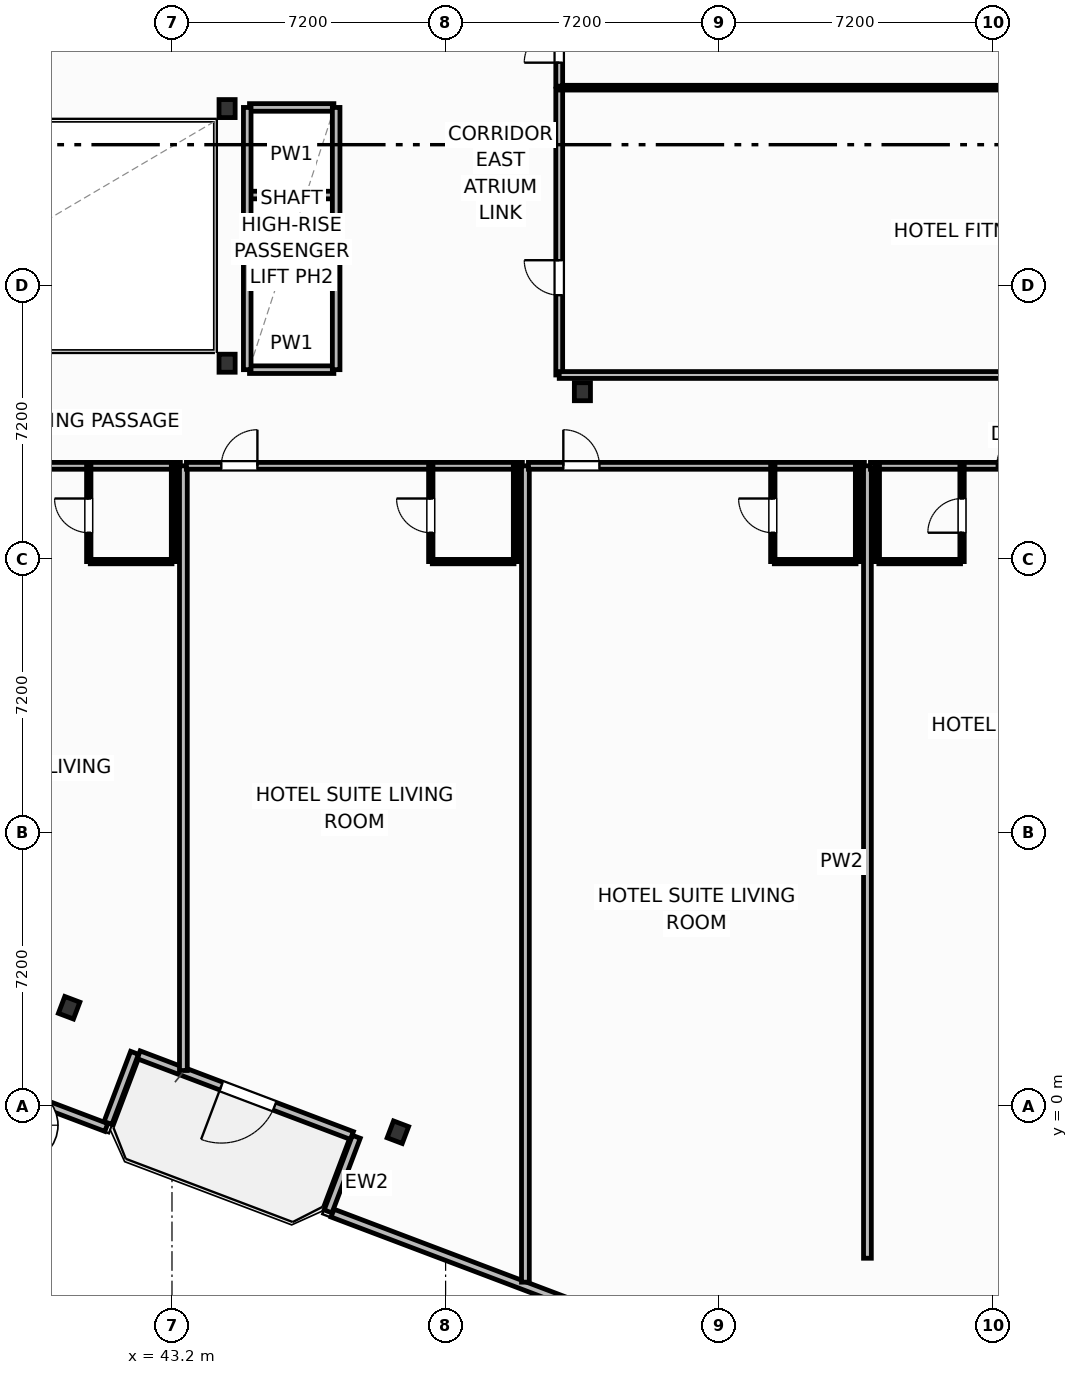
"""IFC4 building model, lengths in metres.
Left out: names, types, materials, properties, quantities, classifications, styles, units other than length and angle.
Written with IfcOpenShell. Run it as: python <this file> out.ifc"""

import sys

from ifc_helpers import new_model, si_unit, direction, frame, frame_2d, origin, origin_2d, place, context, subcontext, project, spatial, rectangle, i_section, extrude, element, fill, save


model = new_model("IFC4")
c1 = context("Model", 3, precision=1e-05, world=origin(), true_north=direction((0.0, 1.0)))
c2 = subcontext(c1, "Body", "Model", "MODEL_VIEW")
j1 = project(units=[si_unit("LENGTHUNIT", "METRE"), si_unit("PLANEANGLEUNIT", "RADIAN")], contexts=[c1])
p1 = place(None, origin())
s1 = spatial("IfcSite", under=j1, at=p1, CompositionType="ELEMENT")
p2 = place(p1, origin())
s2 = spatial("IfcBuilding", under=s1, at=p2, CompositionType="ELEMENT")
p3 = place(p2, frame((0.0, 0.0, 79.9)))
s3 = spatial("IfcBuildingStorey", under=s2, at=p3, CompositionType="ELEMENT", Elevation=79.9)
for number, where, z_axis, x_axis in (
    (1, (44.65, 19.55, 0.0), (0.0, 0.0, 1.0), (1.0, 0.0, 0.0)),
    (2, (44.65, 26.25, 0.0), (0.0, 0.0, 1.0), (1.0, 0.0, 0.0)),
    (3, (54.0, 18.8, 0.0), (0.0, 0.0, 1.0), (1.0, 0.0, 0.0)),
    (4, (40.493, 2.591, 0.0), (0.0, 0.0, 1.0), (0.935, -0.354, 0.0)),
    (5, (49.144, -0.684, 0.0), (0.0, 0.0, 1.0), (0.935, -0.354, 0.0)),
):
    element("IfcColumn", number, at=place(p3, frame(where, z_axis=z_axis, x_axis=x_axis)), inside=s3, PredefinedType="COLUMN", context=c2, shape_type="SweptSolid", body=[
        extrude(i_section(OverallWidth=0.424, OverallDepth=0.474, WebThickness=0.048, FlangeThickness=0.077, FilletRadius=0.025, at=origin_2d()), origin(), (0.0, 0.0, 1.0), 3.7),
    ])
p4 = place(p3, frame((47.935, -0.771, 0.0), z_axis=(0.0, 0.0, 1.0), x_axis=(-0.935227640088, 0.354046976001, 0.0)))
e6 = element("IfcWall", 6, at=p4, inside=s3, PredefinedType="SOLIDWALL", context=c2, shape_type="SweptSolid", body=[
    extrude(rectangle(XDim=6.0, YDim=0.22, at=frame_2d((3.0, 0.0))), origin(), (0.0, 0.0, 1.0), 2.73),
])
p5 = place(p4, frame((2.176, 0.0, 0.0)))
e7 = element("IfcOpeningElement", 7, at=p5, cuts=e6, PredefinedType="OPENING", context=c2, shape_type="SweptSolid", body=[
    extrude(rectangle(XDim=1.5, YDim=2.25, at=frame_2d((0.75, 1.125))), frame((0.0, 0.12, 0.0), z_axis=(0.0, -1.0, 0.0), x_axis=(1.0, 0.0, 0.0)), (0.0, 0.0, 1.0), 0.24),
])
p6 = place(p3, frame((33.957, 2.286, 0.0), z_axis=(0.0, 0.0, 1.0), x_axis=(0.935220736163, -0.354065212427, 0.0)))
e8 = element("IfcWall", 8, at=p6, inside=s3, PredefinedType="SOLIDWALL", context=c2, shape_type="SweptSolid", body=[
    extrude(rectangle(XDim=8.035, YDim=0.22, at=frame_2d((4.018, 0.0))), origin(), (0.0, 0.0, 1.0), 2.73),
])
p7 = place(p6, frame((3.192, 0.0, 0.8)))
e9 = element("IfcOpeningElement", 9, at=p7, cuts=e8, PredefinedType="OPENING", context=c2, shape_type="SweptSolid", body=[
    extrude(rectangle(XDim=1.65, YDim=1.65, at=frame_2d((0.825, 0.825))), frame((0.0, 0.12, 0.0), z_axis=(0.0, -1.0, 0.0), x_axis=(1.0, 0.0, 0.0)), (0.0, 0.0, 1.0), 0.24),
])
p8 = place(p3, frame((41.516, -0.442, 0.0), z_axis=(0.0, 0.0, 1.0), x_axis=(0.354061611705, 0.935222099352, 0.0)))
e10 = element("IfcWall", 10, at=p8, inside=s3, PredefinedType="SOLIDWALL", context=c2, shape_type="SweptSolid", body=[
    extrude(rectangle(XDim=1.975, YDim=0.22, at=frame_2d((0.987, 0.0))), origin(), (0.0, 0.0, 1.0), 2.73),
])
p9 = place(p3, frame((48.051, -0.805, 0.0), z_axis=(0.0, 0.0, 1.0), x_axis=(-0.353988291547, -0.935249854022, 0.0)))
e11 = element("IfcWall", 11, at=p9, inside=s3, PredefinedType="SOLIDWALL", context=c2, shape_type="SweptSolid", body=[
    extrude(rectangle(XDim=2.1, YDim=0.22, at=frame_2d((1.05, 0.0))), origin(), (0.0, 0.0, 1.0), 2.73),
])
p10 = place(p3, frame((47.424, -2.813, 0.0), z_axis=(0.0, 0.0, 1.0), x_axis=(0.935225962032, -0.354051408614, 0.0)))
e12 = element("IfcWall", 12, at=p10, inside=s3, PredefinedType="SOLIDWALL", context=c2, shape_type="SweptSolid", body=[
    extrude(rectangle(XDim=14.347, YDim=0.22, at=frame_2d((7.173, 0.0))), origin(), (0.0, 0.0, 1.0), 2.73),
])
p11 = place(p10, frame((6.348, 0.0, 0.8)))
e13 = element("IfcOpeningElement", 13, at=p11, cuts=e12, PredefinedType="OPENING", context=c2, shape_type="SweptSolid", body=[
    extrude(rectangle(XDim=1.65, YDim=1.65, at=frame_2d((0.825, 0.825))), frame((0.0, 0.12, 0.0), z_axis=(0.0, -1.0, 0.0), x_axis=(1.0, 0.0, 0.0)), (0.0, 0.0, 1.0), 0.24),
])
p12 = place(p3, frame((34.58, 16.85, 0.0), z_axis=(0.0, 0.0, 1.0), x_axis=(1.0, 0.0, 0.0)))
e14 = element("IfcWall", 14, at=p12, inside=s3, PredefinedType="PARTITIONING", context=c2, shape_type="SweptSolid", body=[
    extrude(rectangle(XDim=8.84, YDim=0.18, at=frame_2d((4.42, 0.0))), origin(), (0.0, 0.0, 1.0), 3.45),
])
p13 = place(p12, frame((0.918, 0.0, 0.0)))
e15 = element("IfcOpeningElement", 15, at=p13, cuts=e14, PredefinedType="OPENING", context=c2, shape_type="SweptSolid", body=[
    extrude(rectangle(XDim=0.95, YDim=2.15, at=frame_2d((0.475, 1.075))), frame((0.0, 0.1, 0.0), z_axis=(0.0, -1.0, 0.0), x_axis=(1.0, 0.0, 0.0)), (0.0, 0.0, 1.0), 0.2),
])
p14 = place(p3, frame((41.05, 14.33, 0.0), z_axis=(0.0, 0.0, 1.0), x_axis=(1.0, 0.0, 0.0)))
e16 = element("IfcWall", 16, at=p14, inside=s3, PredefinedType="PARTITIONING", context=c2, shape_type="SweptSolid", body=[
    extrude(rectangle(XDim=2.15, YDim=0.115, at=frame_2d((1.075, 0.0))), origin(), (0.0, 0.0, 1.0), 3.45),
])
p15 = place(p3, frame((41.01, 14.33, 0.0), z_axis=(0.0, 0.0, 1.0), x_axis=(0.0, 1.0, 0.0)))
e17 = element("IfcWall", 17, at=p15, inside=s3, PredefinedType="PARTITIONING", context=c2, shape_type="SweptSolid", body=[
    extrude(rectangle(XDim=2.52, YDim=0.115, at=frame_2d((1.26, 0.0))), origin(), (0.0, 0.0, 1.0), 3.45),
])
p16 = place(p15, frame((0.76, 0.0, 0.0)))
e18 = element("IfcOpeningElement", 18, at=p16, cuts=e17, PredefinedType="OPENING", context=c2, shape_type="SweptSolid", body=[
    extrude(rectangle(XDim=0.9, YDim=2.05, at=frame_2d((0.45, 1.025))), frame((0.0, 0.067, 0.0), z_axis=(0.0, -1.0, 0.0), x_axis=(1.0, 0.0, 0.0)), (0.0, 0.0, 1.0), 0.135),
])
p17 = place(p3, frame((43.24, 14.33, 0.0), z_axis=(0.0, 0.0, 1.0), x_axis=(0.0, 1.0, 0.0)))
e19 = element("IfcWall", 19, at=p17, inside=s3, PredefinedType="PARTITIONING", context=c2, shape_type="SweptSolid", body=[
    extrude(rectangle(XDim=2.52, YDim=0.115, at=frame_2d((1.26, 0.0))), origin(), (0.0, 0.0, 1.0), 2.58),
])
p18 = place(p3, frame((43.5, 0.939, 0.0), z_axis=(0.0, 0.0, 1.0), x_axis=(0.0, 1.0, 0.0)))
e20 = element("IfcWall", 20, at=p18, inside=s3, PredefinedType="PARTITIONING", context=c2, shape_type="SweptSolid", body=[
    extrude(rectangle(XDim=15.911, YDim=0.205, at=frame_2d((7.955, 0.0))), origin(), (0.0, 0.0, 1.0), 2.58),
])
p19 = place(p3, frame((43.58, 16.85, 0.0), z_axis=(0.0, 0.0, 1.0), x_axis=(1.0, 0.0, 0.0)))
e21 = element("IfcWall", 21, at=p19, inside=s3, PredefinedType="PARTITIONING", context=c2, shape_type="SweptSolid", body=[
    extrude(rectangle(XDim=8.84, YDim=0.18, at=frame_2d((4.42, 0.0))), origin(), (0.0, 0.0, 1.0), 3.45),
])
p20 = place(p19, frame((0.918, 0.0, 0.0)))
e22 = element("IfcOpeningElement", 22, at=p20, cuts=e21, PredefinedType="OPENING", context=c2, shape_type="SweptSolid", body=[
    extrude(rectangle(XDim=0.95, YDim=2.15, at=frame_2d((0.475, 1.075))), frame((0.0, 0.1, 0.0), z_axis=(0.0, -1.0, 0.0), x_axis=(1.0, 0.0, 0.0)), (0.0, 0.0, 1.0), 0.2),
])
p21 = place(p3, frame((50.05, 14.33, 0.0), z_axis=(0.0, 0.0, 1.0), x_axis=(1.0, 0.0, 0.0)))
e23 = element("IfcWall", 23, at=p21, inside=s3, PredefinedType="PARTITIONING", context=c2, shape_type="SweptSolid", body=[
    extrude(rectangle(XDim=2.15, YDim=0.115, at=frame_2d((1.075, 0.0))), origin(), (0.0, 0.0, 1.0), 3.45),
])
p22 = place(p3, frame((50.01, 14.33, 0.0), z_axis=(0.0, 0.0, 1.0), x_axis=(0.0, 1.0, 0.0)))
e24 = element("IfcWall", 24, at=p22, inside=s3, PredefinedType="PARTITIONING", context=c2, shape_type="SweptSolid", body=[
    extrude(rectangle(XDim=2.52, YDim=0.115, at=frame_2d((1.26, 0.0))), origin(), (0.0, 0.0, 1.0), 3.45),
])
p23 = place(p22, frame((0.76, 0.0, 0.0)))
e25 = element("IfcOpeningElement", 25, at=p23, cuts=e24, PredefinedType="OPENING", context=c2, shape_type="SweptSolid", body=[
    extrude(rectangle(XDim=0.9, YDim=2.05, at=frame_2d((0.45, 1.025))), frame((0.0, 0.067, 0.0), z_axis=(0.0, -1.0, 0.0), x_axis=(1.0, 0.0, 0.0)), (0.0, 0.0, 1.0), 0.135),
])
p24 = place(p3, frame((52.24, 14.33, 0.0), z_axis=(0.0, 0.0, 1.0), x_axis=(0.0, 1.0, 0.0)))
e26 = element("IfcWall", 26, at=p24, inside=s3, PredefinedType="PARTITIONING", context=c2, shape_type="SweptSolid", body=[
    extrude(rectangle(XDim=2.52, YDim=0.115, at=frame_2d((1.26, 0.0))), origin(), (0.0, 0.0, 1.0), 3.45),
])
p25 = place(p3, frame((52.5, -4.63, 0.0), z_axis=(0.0, 0.0, 1.0), x_axis=(0.0, 1.0, 0.0)))
e27 = element("IfcWall", 27, at=p25, inside=s3, PredefinedType="PARTITIONING", context=c2, shape_type="SweptSolid", body=[
    extrude(rectangle(XDim=21.48, YDim=0.205, at=frame_2d((10.74, 0.0))), origin(), (0.0, 0.0, 1.0), 2.58),
])
p26 = place(p3, frame((52.58, 16.85, 0.0), z_axis=(0.0, 0.0, 1.0), x_axis=(1.0, 0.0, 0.0)))
e28 = element("IfcWall", 28, at=p26, inside=s3, PredefinedType="PARTITIONING", context=c2, shape_type="SweptSolid", body=[
    extrude(rectangle(XDim=8.84, YDim=0.18, at=frame_2d((4.42, 0.0))), origin(), (0.0, 0.0, 1.0), 2.58),
])
p27 = place(p26, frame((0.918, 0.0, 0.0)))
e29 = element("IfcOpeningElement", 29, at=p27, cuts=e28, PredefinedType="OPENING", context=c2, shape_type="SweptSolid", body=[
    extrude(rectangle(XDim=0.95, YDim=2.15, at=frame_2d((0.475, 1.075))), frame((0.0, 0.1, 0.0), z_axis=(0.0, -1.0, 0.0), x_axis=(1.0, 0.0, 0.0)), (0.0, 0.0, 1.0), 0.2),
])
p28 = place(p3, frame((59.05, 14.33, 0.0), z_axis=(0.0, 0.0, 1.0), x_axis=(1.0, 0.0, 0.0)))
e30 = element("IfcWall", 30, at=p28, inside=s3, PredefinedType="PARTITIONING", context=c2, shape_type="SweptSolid", body=[
    extrude(rectangle(XDim=2.15, YDim=0.115, at=frame_2d((1.075, 0.0))), origin(), (0.0, 0.0, 1.0), 3.45),
])
p29 = place(p3, frame((59.01, 14.33, 0.0), z_axis=(0.0, 0.0, 1.0), x_axis=(0.0, 1.0, 0.0)))
e31 = element("IfcWall", 31, at=p29, inside=s3, PredefinedType="PARTITIONING", context=c2, shape_type="SweptSolid", body=[
    extrude(rectangle(XDim=2.52, YDim=0.115, at=frame_2d((1.26, 0.0))), origin(), (0.0, 0.0, 1.0), 3.45),
])
p30 = place(p29, frame((0.76, 0.0, 0.0)))
e32 = element("IfcOpeningElement", 32, at=p30, cuts=e31, PredefinedType="OPENING", context=c2, shape_type="SweptSolid", body=[
    extrude(rectangle(XDim=0.9, YDim=2.05, at=frame_2d((0.45, 1.025))), frame((0.0, 0.067, 0.0), z_axis=(0.0, -1.0, 0.0), x_axis=(1.0, 0.0, 0.0)), (0.0, 0.0, 1.0), 0.135),
])
p31 = place(p3, frame((61.24, 14.33, 0.0), z_axis=(0.0, 0.0, 1.0), x_axis=(0.0, 1.0, 0.0)))
e33 = element("IfcWall", 33, at=p31, inside=s3, PredefinedType="PARTITIONING", context=c2, shape_type="SweptSolid", body=[
    extrude(rectangle(XDim=2.52, YDim=0.115, at=frame_2d((1.26, 0.0))), origin(), (0.0, 0.0, 1.0), 3.45),
])
p32 = place(p3, frame((61.5, -4.0, 0.0), z_axis=(0.0, 0.0, 1.0), x_axis=(0.0, 1.0, 0.0)))
e34 = element("IfcWall", 34, at=p32, inside=s3, PredefinedType="PARTITIONING", context=c2, shape_type="SweptSolid", body=[
    extrude(rectangle(XDim=20.85, YDim=0.205, at=frame_2d((10.425, 0.0))), origin(), (0.0, 0.0, 1.0), 3.45),
])
p33 = place(p3, frame((61.58, 16.85, 0.0), z_axis=(0.0, 0.0, 1.0), x_axis=(1.0, 0.0, 0.0)))
e35 = element("IfcWall", 35, at=p33, inside=s3, PredefinedType="PARTITIONING", context=c2, shape_type="SweptSolid", body=[
    extrude(rectangle(XDim=14.222, YDim=0.18, at=frame_2d((7.111, 0.0))), origin(), (0.0, 0.0, 1.0), 3.45),
])
p34 = place(p33, frame((3.325, 0.0, 0.0)))
e36 = element("IfcOpeningElement", 36, at=p34, cuts=e35, PredefinedType="OPENING", context=c2, shape_type="SweptSolid", body=[
    extrude(rectangle(XDim=0.95, YDim=2.15, at=frame_2d((0.475, 1.075))), frame((0.0, 0.1, 0.0), z_axis=(0.0, -1.0, 0.0), x_axis=(1.0, 0.0, 0.0)), (0.0, 0.0, 1.0), 0.2),
])
p35 = place(p3, frame((61.8, 14.33, 0.0), z_axis=(0.0, 0.0, 1.0), x_axis=(1.0, 0.0, 0.0)))
e37 = element("IfcWall", 37, at=p35, inside=s3, PredefinedType="PARTITIONING", context=c2, shape_type="SweptSolid", body=[
    extrude(rectangle(XDim=2.15, YDim=0.115, at=frame_2d((1.075, 0.0))), origin(), (0.0, 0.0, 1.0), 3.45),
])
p36 = place(p3, frame((63.99, 14.33, 0.0), z_axis=(0.0, 0.0, 1.0), x_axis=(0.0, 1.0, 0.0)))
e38 = element("IfcWall", 38, at=p36, inside=s3, PredefinedType="PARTITIONING", context=c2, shape_type="SweptSolid", body=[
    extrude(rectangle(XDim=2.52, YDim=0.115, at=frame_2d((1.26, 0.0))), origin(), (0.0, 0.0, 1.0), 3.45),
])
p37 = place(p36, frame((0.76, 0.0, 0.0)))
e39 = element("IfcOpeningElement", 39, at=p37, cuts=e38, PredefinedType="OPENING", context=c2, shape_type="SweptSolid", body=[
    extrude(rectangle(XDim=0.9, YDim=2.05, at=frame_2d((0.45, 1.025))), frame((0.0, 0.067, 0.0), z_axis=(0.0, -1.0, 0.0), x_axis=(1.0, 0.0, 0.0)), (0.0, 0.0, 1.0), 0.135),
])
p38 = place(p3, frame((61.76, 14.33, 0.0), z_axis=(0.0, 0.0, 1.0), x_axis=(0.0, 1.0, 0.0)))
e40 = element("IfcWall", 40, at=p38, inside=s3, PredefinedType="PARTITIONING", context=c2, shape_type="SweptSolid", body=[
    extrude(rectangle(XDim=2.52, YDim=0.115, at=frame_2d((1.26, 0.0))), origin(), (0.0, 0.0, 1.0), 3.45),
])
p39 = place(p3, frame((53.39, 19.24, 0.0), z_axis=(0.0, 0.0, 1.0), x_axis=(0.0, 1.0, 0.0)))
e41 = element("IfcWall", 41, at=p39, inside=s3, PredefinedType="PARTITIONING", context=c2, shape_type="SweptSolid", body=[
    extrude(rectangle(XDim=7.52, YDim=0.18, at=frame_2d((3.76, 0.0))), origin(), (0.0, 0.0, 1.0), 3.45),
])
p40 = place(p39, frame((2.1, 0.0, 0.0)))
e42 = element("IfcOpeningElement", 42, at=p40, cuts=e41, PredefinedType="OPENING", context=c2, shape_type="SweptSolid", body=[
    extrude(rectangle(XDim=0.92, YDim=2.05, at=frame_2d((0.46, 1.025))), frame((0.0, 0.1, 0.0), z_axis=(0.0, -1.0, 0.0), x_axis=(1.0, 0.0, 0.0)), (0.0, 0.0, 1.0), 0.2),
])
p41 = place(p3, frame((53.39, 26.8, 0.0), z_axis=(0.0, 0.0, 1.0), x_axis=(1.0, 0.0, 0.0)))
e43 = element("IfcWall", 43, at=p41, inside=s3, PredefinedType="PARTITIONING", context=c2, shape_type="SweptSolid", body=[
    extrude(rectangle(XDim=23.61, YDim=0.125, at=frame_2d((11.805, 0.0))), origin(), (0.0, 0.0, 1.0), 3.45),
])
p42 = place(p3, frame((53.39, 19.24, 0.0), z_axis=(0.0, 0.0, 1.0), x_axis=(1.0, 0.0, 0.0)))
e44 = element("IfcWall", 44, at=p42, inside=s3, PredefinedType="PARTITIONING", context=c2, shape_type="SweptSolid", body=[
    extrude(rectangle(XDim=23.317, YDim=0.18, at=frame_2d((11.658, 0.0))), origin(), (0.0, 0.0, 1.0), 3.45),
])
p43 = place(p3, frame((53.39, 26.84, 0.0), z_axis=(0.0, 0.0, 1.0), x_axis=(0.0, 1.0, 0.0)))
e45 = element("IfcWall", 45, at=p43, inside=s3, PredefinedType="PARTITIONING", context=c2, shape_type="SweptSolid", body=[
    extrude(rectangle(XDim=12.46, YDim=0.18, at=frame_2d((6.23, 0.0))), origin(), (0.0, 0.0, 1.0), 3.45),
])
p44 = place(p43, frame((0.618, 0.0, 0.0)))
e46 = element("IfcOpeningElement", 46, at=p44, cuts=e45, PredefinedType="OPENING", context=c2, shape_type="SweptSolid", body=[
    extrude(rectangle(XDim=0.92, YDim=2.05, at=frame_2d((0.46, 1.025))), frame((0.0, 0.1, 0.0), z_axis=(0.0, -1.0, 0.0), x_axis=(1.0, 0.0, 0.0)), (0.0, 0.0, 1.0), 0.2),
])
for number, where, z_axis, x_axis in (
    (47, (45.24, 21.675, 0.0), (0.0, 0.0, 1.0), (1.0, 0.0, 0.0)),
    (48, (45.24, 23.975, 0.0), (0.0, 0.0, 1.0), (1.0, 0.0, 0.0)),
):
    element("IfcWall", number, at=place(p3, frame(where, z_axis=z_axis, x_axis=x_axis)), inside=s3, PredefinedType="PARTITIONING", context=c2, shape_type="SweptSolid", body=[
        extrude(rectangle(XDim=2.22, YDim=0.2, at=frame_2d((1.11, 0.0))), origin(), (0.0, 0.0, 1.0), 3.45),
    ])
p45 = place(p3, frame((45.24, 19.38, 0.0), z_axis=(0.0, 0.0, 1.0), x_axis=(1.0, 0.0, 0.0)))
e49 = element("IfcWall", 49, at=p45, inside=s3, PredefinedType="PARTITIONING", context=c2, shape_type="SweptSolid", body=[
    extrude(rectangle(XDim=2.22, YDim=0.2, at=frame_2d((1.11, 0.0))), origin(), (0.0, 0.0, 1.0), 2.662),
])
p46 = place(p3, frame((45.24, 26.28, 0.0), z_axis=(0.0, 0.0, 1.0), x_axis=(1.0, 0.0, 0.0)))
e50 = element("IfcWall", 50, at=p46, inside=s3, PredefinedType="PARTITIONING", context=c2, shape_type="SweptSolid", body=[
    extrude(rectangle(XDim=2.22, YDim=0.2, at=frame_2d((1.11, 0.0))), origin(), (0.0, 0.0, 1.0), 3.45),
])
for number, where, z_axis, x_axis in (
    (51, (45.18, 19.38, 0.0), (0.0, 0.0, 1.0), (0.0, 1.0, 0.0)),
    (52, (47.52, 19.38, 0.0), (0.0, 0.0, 1.0), (0.0, 1.0, 0.0)),
):
    element("IfcWall", number, at=place(p3, frame(where, z_axis=z_axis, x_axis=x_axis)), inside=s3, PredefinedType="PARTITIONING", context=c2, shape_type="SweptSolid", body=[
        extrude(rectangle(XDim=6.9, YDim=0.2, at=frame_2d((3.45, 0.0))), origin(), (0.0, 0.0, 1.0), 3.45),
    ])
p47 = place(p5, origin())
e53 = element("IfcDoor", 53, at=p47, inside=s3, OperationType="SINGLE_SWING_RIGHT", PredefinedType="DOOR", context=c2, shape_type="SweptSolid", body=[
    extrude(rectangle(XDim=1.5, YDim=2.25, at=frame_2d((0.75, 1.125))), frame((0.0, 0.025, 0.0), z_axis=(0.0, -1.0, 0.0), x_axis=(1.0, 0.0, 0.0)), (0.0, 0.0, 1.0), 0.05),
])
fill(e7, e53)
p48 = place(p16, origin())
e54 = element("IfcDoor", 54, at=p48, inside=s3, OperationType="SINGLE_SWING_RIGHT", PredefinedType="DOOR", context=c2, shape_type="SweptSolid", body=[
    extrude(rectangle(XDim=0.9, YDim=2.05, at=frame_2d((0.45, 1.025))), frame((0.0, 0.025, 0.0), z_axis=(0.0, -1.0, 0.0), x_axis=(1.0, 0.0, 0.0)), (0.0, 0.0, 1.0), 0.05),
])
fill(e18, e54)
p49 = place(p20, origin())
e55 = element("IfcDoor", 55, at=p49, inside=s3, OperationType="SINGLE_SWING_RIGHT", PredefinedType="DOOR", context=c2, shape_type="SweptSolid", body=[
    extrude(rectangle(XDim=0.95, YDim=2.15, at=frame_2d((0.475, 1.075))), frame((0.0, 0.025, 0.0), z_axis=(0.0, -1.0, 0.0), x_axis=(1.0, 0.0, 0.0)), (0.0, 0.0, 1.0), 0.05),
])
fill(e22, e55)
p50 = place(p23, origin())
e56 = element("IfcDoor", 56, at=p50, inside=s3, OperationType="SINGLE_SWING_RIGHT", PredefinedType="DOOR", context=c2, shape_type="SweptSolid", body=[
    extrude(rectangle(XDim=0.9, YDim=2.05, at=frame_2d((0.45, 1.025))), frame((0.0, 0.025, 0.0), z_axis=(0.0, -1.0, 0.0), x_axis=(1.0, 0.0, 0.0)), (0.0, 0.0, 1.0), 0.05),
])
fill(e25, e56)
p51 = place(p27, origin())
e57 = element("IfcDoor", 57, at=p51, inside=s3, OperationType="SINGLE_SWING_LEFT", PredefinedType="DOOR", context=c2, shape_type="SweptSolid", body=[
    extrude(rectangle(XDim=0.95, YDim=2.15, at=frame_2d((0.475, 1.075))), frame((0.0, 0.025, 0.0), z_axis=(0.0, -1.0, 0.0), x_axis=(1.0, 0.0, 0.0)), (0.0, 0.0, 1.0), 0.05),
])
fill(e29, e57)
p52 = place(p30, origin())
e58 = element("IfcDoor", 58, at=p52, inside=s3, OperationType="SINGLE_SWING_RIGHT", PredefinedType="DOOR", context=c2, shape_type="SweptSolid", body=[
    extrude(rectangle(XDim=0.9, YDim=2.05, at=frame_2d((0.45, 1.025))), frame((0.0, 0.025, 0.0), z_axis=(0.0, -1.0, 0.0), x_axis=(1.0, 0.0, 0.0)), (0.0, 0.0, 1.0), 0.05),
])
fill(e32, e58)
p53 = place(p34, origin())
e59 = element("IfcDoor", 59, at=p53, inside=s3, OperationType="SINGLE_SWING_RIGHT", PredefinedType="DOOR", context=c2, shape_type="SweptSolid", body=[
    extrude(rectangle(XDim=0.95, YDim=2.15, at=frame_2d((0.475, 1.075))), frame((0.0, 0.025, 0.0), z_axis=(0.0, -1.0, 0.0), x_axis=(1.0, 0.0, 0.0)), (0.0, 0.0, 1.0), 0.05),
])
fill(e36, e59)
p54 = place(p37, origin())
e60 = element("IfcDoor", 60, at=p54, inside=s3, OperationType="SINGLE_SWING_LEFT", PredefinedType="DOOR", context=c2, shape_type="SweptSolid", body=[
    extrude(rectangle(XDim=0.9, YDim=2.05, at=frame_2d((0.45, 1.025))), frame((0.0, 0.025, 0.0), z_axis=(0.0, -1.0, 0.0), x_axis=(1.0, 0.0, 0.0)), (0.0, 0.0, 1.0), 0.05),
])
fill(e39, e60)
p55 = place(p40, origin())
e61 = element("IfcDoor", 61, at=p55, inside=s3, OperationType="SINGLE_SWING_RIGHT", PredefinedType="DOOR", context=c2, shape_type="SweptSolid", body=[
    extrude(rectangle(XDim=0.92, YDim=2.05, at=frame_2d((0.46, 1.025))), frame((0.0, 0.025, 0.0), z_axis=(0.0, -1.0, 0.0), x_axis=(1.0, 0.0, 0.0)), (0.0, 0.0, 1.0), 0.05),
])
fill(e42, e61)
p56 = place(p44, origin())
e62 = element("IfcDoor", 62, at=p56, inside=s3, OperationType="SINGLE_SWING_LEFT", PredefinedType="DOOR", context=c2, shape_type="SweptSolid", body=[
    extrude(rectangle(XDim=0.92, YDim=2.05, at=frame_2d((0.46, 1.025))), frame((0.0, 0.025, 0.0), z_axis=(0.0, -1.0, 0.0), x_axis=(1.0, 0.0, 0.0)), (0.0, 0.0, 1.0), 0.05),
])
fill(e46, e62)
save(model, sys.argv[1])
